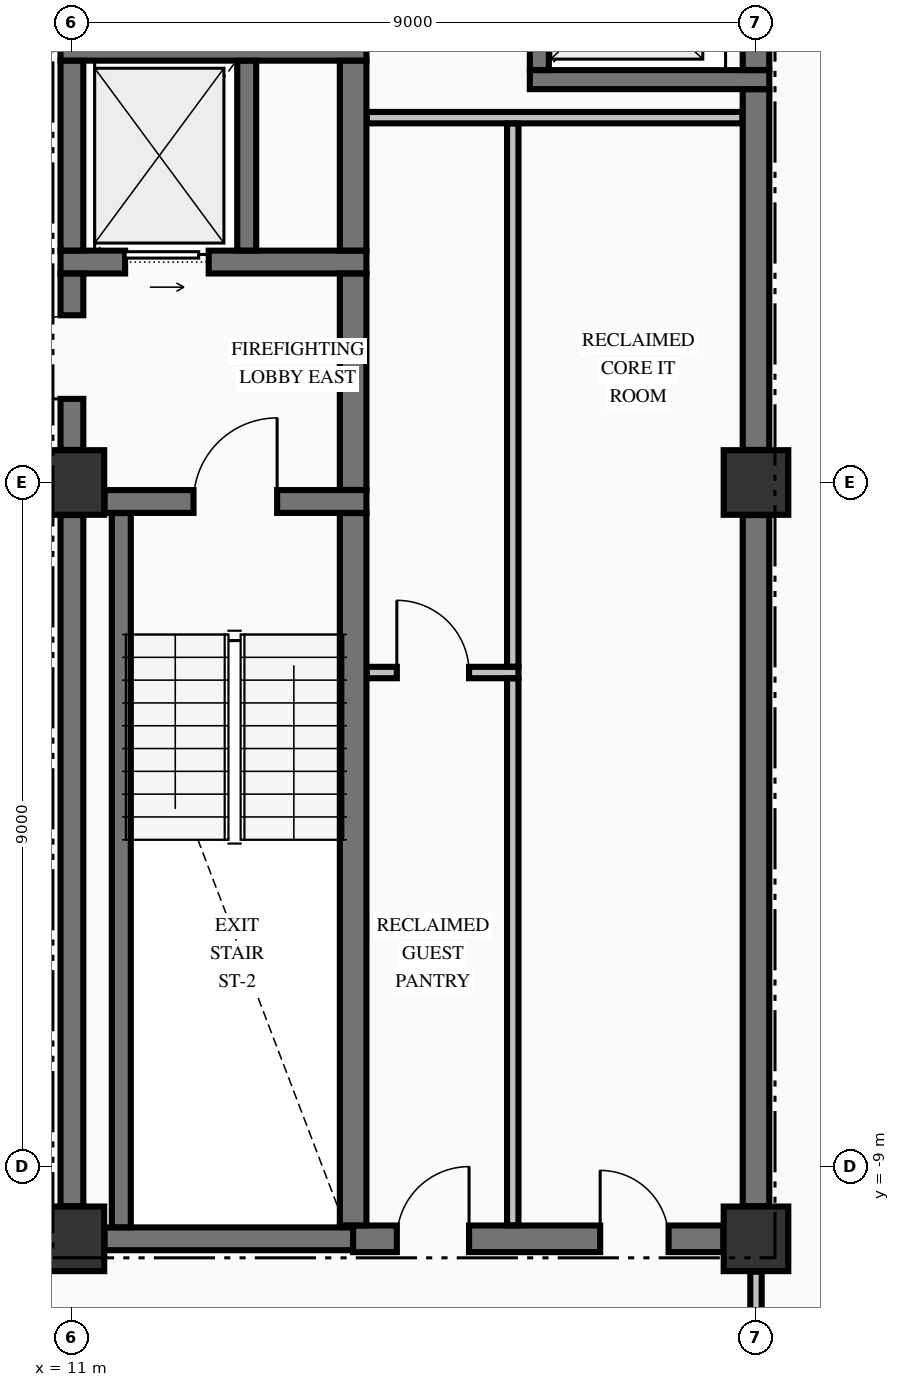
"""IFC4 building model, lengths in metres.
Left out: names, types, materials, properties, quantities, classifications, styles, units other than length and angle.
Written with IfcOpenShell. Run it as: python <this file> out.ifc"""

import sys

from ifc_helpers import new_model, si_unit, direction, frame, frame_2d, origin, origin_2d, place, context, subcontext, project, spatial, rectangle, extrude, element, fill, save


model = new_model("IFC4")
c1 = context("Model", 3, precision=1e-05, world=origin(), true_north=direction((0.0, 1.0)))
c2 = subcontext(c1, "Body", "Model", "MODEL_VIEW")
j1 = project(units=[si_unit("LENGTHUNIT", "METRE"), si_unit("PLANEANGLEUNIT", "RADIAN")], contexts=[c1])
p1 = place(None, origin())
s1 = spatial("IfcSite", under=j1, at=p1, CompositionType="ELEMENT")
p2 = place(p1, origin())
s2 = spatial("IfcBuilding", under=s1, at=p2, CompositionType="ELEMENT")
p3 = place(p2, frame((0.0, 0.0, 218.66)))
s3 = spatial("IfcBuildingStorey", under=s2, at=p3, CompositionType="ELEMENT", Elevation=218.66)
for number, where, z_axis, x_axis in (
    (1, (11.0, -9.95, -0.25), (0.0, 0.0, 1.0), (1.0, 0.0, 0.0)),
    (2, (11.0, 0.0, -0.25), (0.0, 0.0, 1.0), (1.0, 0.0, 0.0)),
    (3, (20.0, -9.95, -0.25), (0.0, 0.0, 1.0), (1.0, 0.0, 0.0)),
    (4, (20.0, 0.0, -0.25), (0.0, 0.0, 1.0), (1.0, 0.0, 0.0)),
):
    element("IfcColumn", number, at=place(p3, frame(where, z_axis=z_axis, x_axis=x_axis)), inside=s3, PredefinedType="COLUMN", context=c2, shape_type="SweptSolid", body=[
        extrude(rectangle(XDim=0.85, YDim=0.85, at=origin_2d()), origin(), (0.0, 0.0, 1.0), 3.225),
    ])
p4 = place(p3, frame((11.429, -9.95, 0.0), z_axis=(0.0, 0.0, 1.0), x_axis=(1.0, 0.0, 0.0)))
e5 = element("IfcWall", 5, at=p4, inside=s3, PredefinedType="SHEAR", context=c2, shape_type="SweptSolid", body=[
    extrude(rectangle(XDim=3.271, YDim=0.3, at=frame_2d((1.635, 0.0))), origin(), (0.0, 0.0, 1.0), 2.975),
])
p5 = place(p3, frame((14.7, -9.95, 0.0), z_axis=(0.0, 0.0, 1.0), x_axis=(1.0, 0.0, 0.0)))
e6 = element("IfcWall", 6, at=p5, inside=s3, PredefinedType="SHEAR", context=c2, shape_type="SweptSolid", body=[
    extrude(rectangle(XDim=4.871, YDim=0.35, at=frame_2d((2.436, 0.0))), origin(), (0.0, 0.0, 1.0), 2.975),
])
p6 = place(p5, frame((3.25, 0.0, 0.0)))
e7 = element("IfcOpeningElement", 7, at=p6, cuts=e6, PredefinedType="OPENING", context=c2, shape_type="SweptSolid", body=[
    extrude(rectangle(XDim=0.9, YDim=2.15, at=frame_2d((0.45, 1.075))), frame((0.0, 0.185, 0.0), z_axis=(0.0, -1.0, 0.0), x_axis=(1.0, 0.0, 0.0)), (0.0, 0.0, 1.0), 0.37),
])
p7 = place(p5, frame((0.575, 0.0, 0.0)))
e8 = element("IfcOpeningElement", 8, at=p7, cuts=e6, PredefinedType="OPENING", context=c2, shape_type="SweptSolid", body=[
    extrude(rectangle(XDim=0.95, YDim=2.15, at=frame_2d((0.475, 1.075))), frame((0.0, 0.185, 0.0), z_axis=(0.0, -1.0, 0.0), x_axis=(1.0, 0.0, 0.0)), (0.0, 0.0, 1.0), 0.37),
])
p8 = place(p3, frame((11.429, -0.25, 0.0), z_axis=(0.0, 0.0, 1.0), x_axis=(1.0, 0.0, 0.0)))
e9 = element("IfcWall", 9, at=p8, inside=s3, PredefinedType="SHEAR", context=c2, shape_type="SweptSolid", body=[
    extrude(rectangle(XDim=3.446, YDim=0.3, at=frame_2d((1.723, 0.0))), origin(), (0.0, 0.0, 1.0), 2.975),
])
p9 = place(p8, frame((1.171, 0.0, 0.0)))
e10 = element("IfcOpeningElement", 10, at=p9, cuts=e9, PredefinedType="OPENING", context=c2, shape_type="SweptSolid", body=[
    extrude(rectangle(XDim=1.1, YDim=2.15, at=frame_2d((0.55, 1.075))), frame((0.0, 0.16, 0.0), z_axis=(0.0, -1.0, 0.0), x_axis=(1.0, 0.0, 0.0)), (0.0, 0.0, 1.0), 0.32),
])
p10 = place(p3, frame((10.85, 2.9, 0.0), z_axis=(0.0, 0.0, 1.0), x_axis=(1.0, 0.0, 0.0)))
e11 = element("IfcWall", 11, at=p10, inside=s3, PredefinedType="SHEAR", context=c2, shape_type="SweptSolid", body=[
    extrude(rectangle(XDim=4.025, YDim=0.3, at=frame_2d((2.012, 0.0))), origin(), (0.0, 0.0, 1.0), 2.975),
])
p11 = place(p10, frame((0.85, 0.0, 0.0)))
e12 = element("IfcOpeningElement", 12, at=p11, cuts=e11, PredefinedType="OPENING", context=c2, shape_type="SweptSolid", body=[
    extrude(rectangle(XDim=1.1, YDim=2.2, at=frame_2d((0.55, 1.1))), frame((0.0, 0.16, 0.0), z_axis=(0.0, -1.0, 0.0), x_axis=(1.0, 0.0, 0.0)), (0.0, 0.0, 1.0), 0.32),
])
p12 = place(p3, frame((17.025, 5.3, 0.0), z_axis=(0.0, 0.0, 1.0), x_axis=(1.0, 0.0, 0.0)))
e13 = element("IfcWall", 13, at=p12, inside=s3, PredefinedType="SOLIDWALL", context=c2, shape_type="SweptSolid", body=[
    extrude(rectangle(XDim=3.15, YDim=0.25, at=frame_2d((1.575, 0.0))), origin(), (0.0, 0.0, 1.0), 2.975),
])
p13 = place(p3, frame((10.85, 5.7, 0.0), z_axis=(0.0, 0.0, 1.0), x_axis=(1.0, 0.0, 0.0)))
e14 = element("IfcWall", 14, at=p13, inside=s3, PredefinedType="SHEAR", context=c2, shape_type="SweptSolid", body=[
    extrude(rectangle(XDim=4.025, YDim=0.3, at=frame_2d((2.012, 0.0))), origin(), (0.0, 0.0, 1.0), 2.975),
])
p14 = place(p3, frame((14.878, -2.5, 0.0), z_axis=(0.0, 0.0, 1.0), x_axis=(1.0, 0.0, 0.0)))
e15 = element("IfcWall", 15, at=p14, inside=s3, PredefinedType="PARTITIONING", context=c2, shape_type="SweptSolid", body=[
    extrude(rectangle(XDim=1.997, YDim=0.15, at=frame_2d((0.999, 0.0))), origin(), (0.0, 0.0, 1.0), 2.975),
])
p15 = place(p14, frame((0.397, 0.0, 0.0)))
e16 = element("IfcOpeningElement", 16, at=p15, cuts=e15, PredefinedType="OPENING", context=c2, shape_type="SweptSolid", body=[
    extrude(rectangle(XDim=0.95, YDim=2.15, at=frame_2d((0.475, 1.075))), frame((0.0, 0.085, 0.0), z_axis=(0.0, -1.0, 0.0), x_axis=(1.0, 0.0, 0.0)), (0.0, 0.0, 1.0), 0.17),
])
p16 = place(p3, frame((14.878, 4.8, 0.0), z_axis=(0.0, 0.0, 1.0), x_axis=(1.0, 0.0, 0.0)))
e17 = element("IfcWall", 17, at=p16, inside=s3, PredefinedType="PARTITIONING", context=c2, shape_type="SweptSolid", body=[
    extrude(rectangle(XDim=4.944, YDim=0.15, at=frame_2d((2.472, 0.0))), origin(), (0.0, 0.0, 1.0), 2.975),
])
p17 = place(p3, frame((11.0, -9.521, 0.0), z_axis=(0.0, 0.0, 1.0), x_axis=(0.0, 1.0, 0.0)))
e18 = element("IfcWall", 18, at=p17, inside=s3, PredefinedType="SHEAR", context=c2, shape_type="SweptSolid", body=[
    extrude(rectangle(XDim=9.092, YDim=0.3, at=frame_2d((4.546, 0.0))), origin(), (0.0, 0.0, 1.0), 2.975),
])
p18 = place(p3, frame((11.0, 0.429, 0.0), z_axis=(0.0, 0.0, 1.0), x_axis=(0.0, 1.0, 0.0)))
e19 = element("IfcWall", 19, at=p18, inside=s3, PredefinedType="SHEAR", context=c2, shape_type="SweptSolid", body=[
    extrude(rectangle(XDim=2.319, YDim=0.3, at=frame_2d((1.16, 0.0))), origin(), (0.0, 0.0, 1.0), 2.975),
])
p19 = place(p18, frame((0.671, 0.0, 0.0)))
e20 = element("IfcOpeningElement", 20, at=p19, cuts=e19, PredefinedType="OPENING", context=c2, shape_type="SweptSolid", body=[
    extrude(rectangle(XDim=1.1, YDim=2.15, at=frame_2d((0.55, 1.075))), frame((0.0, 0.16, 0.0), z_axis=(0.0, -1.0, 0.0), x_axis=(1.0, 0.0, 0.0)), (0.0, 0.0, 1.0), 0.32),
])
p20 = place(p3, frame((11.0, 3.052, 0.0), z_axis=(0.0, 0.0, 1.0), x_axis=(0.0, 1.0, 0.0)))
e21 = element("IfcWall", 21, at=p20, inside=s3, PredefinedType="SHEAR", context=c2, shape_type="SweptSolid", body=[
    extrude(rectangle(XDim=2.496, YDim=0.3, at=frame_2d((1.248, 0.0))), origin(), (0.0, 0.0, 1.0), 2.975),
])
p21 = place(p3, frame((11.65, -9.798, 0.0), z_axis=(0.0, 0.0, 1.0), x_axis=(0.0, 1.0, 0.0)))
e22 = element("IfcWall", 22, at=p21, inside=s3, PredefinedType="SOLIDWALL", context=c2, shape_type="SweptSolid", body=[
    extrude(rectangle(XDim=9.396, YDim=0.25, at=frame_2d((4.698, 0.0))), origin(), (0.0, 0.0, 1.0), 2.975),
])
p22 = place(p3, frame((13.3, 3.052, 0.0), z_axis=(0.0, 0.0, 1.0), x_axis=(0.0, 1.0, 0.0)))
e23 = element("IfcWall", 23, at=p22, inside=s3, PredefinedType="SOLIDWALL", context=c2, shape_type="SweptSolid", body=[
    extrude(rectangle(XDim=2.496, YDim=0.25, at=frame_2d((1.248, 0.0))), origin(), (0.0, 0.0, 1.0), 2.975),
])
p23 = place(p3, frame((14.7, -9.773, 0.0), z_axis=(0.0, 0.0, 1.0), x_axis=(0.0, 1.0, 0.0)))
e24 = element("IfcWall", 24, at=p23, inside=s3, PredefinedType="SHEAR", context=c2, shape_type="SweptSolid", body=[
    extrude(rectangle(XDim=9.371, YDim=0.35, at=frame_2d((4.686, 0.0))), origin(), (0.0, 0.0, 1.0), 2.975),
])
p24 = place(p3, frame((14.7, -0.098, 0.0), z_axis=(0.0, 0.0, 1.0), x_axis=(0.0, 1.0, 0.0)))
e25 = element("IfcWall", 25, at=p24, inside=s3, PredefinedType="SHEAR", context=c2, shape_type="SweptSolid", body=[
    extrude(rectangle(XDim=2.846, YDim=0.35, at=frame_2d((1.423, 0.0))), origin(), (0.0, 0.0, 1.0), 2.975),
])
p25 = place(p3, frame((14.7, 3.052, 0.0), z_axis=(0.0, 0.0, 1.0), x_axis=(0.0, 1.0, 0.0)))
e26 = element("IfcWall", 26, at=p25, inside=s3, PredefinedType="SHEAR", context=c2, shape_type="SweptSolid", body=[
    extrude(rectangle(XDim=2.496, YDim=0.35, at=frame_2d((1.248, 0.0))), origin(), (0.0, 0.0, 1.0), 2.975),
])
p26 = place(p3, frame((17.15, 5.427, 0.0), z_axis=(0.0, 0.0, 1.0), x_axis=(0.0, 1.0, 0.0)))
e27 = element("IfcWall", 27, at=p26, inside=s3, PredefinedType="SOLIDWALL", context=c2, shape_type="SweptSolid", body=[
    extrude(rectangle(XDim=2.196, YDim=0.25, at=frame_2d((1.098, 0.0))), origin(), (0.0, 0.0, 1.0), 2.975),
])
p27 = place(p26, frame((0.548, 0.0, 0.0)))
e28 = element("IfcOpeningElement", 28, at=p27, cuts=e27, PredefinedType="OPENING", context=c2, shape_type="SweptSolid", body=[
    extrude(rectangle(XDim=1.1, YDim=2.2, at=frame_2d((0.55, 1.1))), frame((0.0, 0.135, 0.0), z_axis=(0.0, -1.0, 0.0), x_axis=(1.0, 0.0, 0.0)), (0.0, 0.0, 1.0), 0.27),
])
p28 = place(p3, frame((20.0, -9.521, 0.0), z_axis=(0.0, 0.0, 1.0), x_axis=(0.0, 1.0, 0.0)))
e29 = element("IfcWall", 29, at=p28, inside=s3, PredefinedType="SHEAR", context=c2, shape_type="SweptSolid", body=[
    extrude(rectangle(XDim=9.092, YDim=0.35, at=frame_2d((4.546, 0.0))), origin(), (0.0, 0.0, 1.0), 2.975),
])
p29 = place(p3, frame((20.0, 0.429, 0.0), z_axis=(0.0, 0.0, 1.0), x_axis=(0.0, 1.0, 0.0)))
e30 = element("IfcWall", 30, at=p29, inside=s3, PredefinedType="SHEAR", context=c2, shape_type="SweptSolid", body=[
    extrude(rectangle(XDim=4.744, YDim=0.35, at=frame_2d((2.372, 0.0))), origin(), (0.0, 0.0, 1.0), 2.975),
])
p30 = place(p3, frame((20.0, 5.427, 0.0), z_axis=(0.0, 0.0, 1.0), x_axis=(0.0, 1.0, 0.0)))
e31 = element("IfcWall", 31, at=p30, inside=s3, PredefinedType="SHEAR", context=c2, shape_type="SweptSolid", body=[
    extrude(rectangle(XDim=2.196, YDim=0.35, at=frame_2d((1.098, 0.0))), origin(), (0.0, 0.0, 1.0), 2.975),
])
p31 = place(p3, frame((16.8, -9.772, 0.0), z_axis=(0.0, 0.0, 1.0), x_axis=(0.0, 1.0, 0.0)))
e32 = element("IfcWall", 32, at=p31, inside=s3, PredefinedType="PARTITIONING", context=c2, shape_type="SweptSolid", body=[
    extrude(rectangle(XDim=7.194, YDim=0.15, at=frame_2d((3.597, 0.0))), origin(), (0.0, 0.0, 1.0), 2.975),
])
p32 = place(p3, frame((16.8, -2.422, 0.0), z_axis=(0.0, 0.0, 1.0), x_axis=(0.0, 1.0, 0.0)))
e33 = element("IfcWall", 33, at=p32, inside=s3, PredefinedType="PARTITIONING", context=c2, shape_type="SweptSolid", body=[
    extrude(rectangle(XDim=7.144, YDim=0.15, at=frame_2d((3.572, 0.0))), origin(), (0.0, 0.0, 1.0), 2.975),
])
p33 = place(p3, frame((20.0, -12.222, 0.0), z_axis=(0.0, 0.0, 1.0), x_axis=(0.0, 1.0, 0.0)))
e34 = element("IfcWall", 34, at=p33, inside=s3, PredefinedType="PARTITIONING", context=c2, shape_type="SweptSolid", body=[
    extrude(rectangle(XDim=1.841, YDim=0.15, at=frame_2d((0.92, 0.0))), origin(), (0.0, 0.0, 1.0), 2.167),
])
p34 = place(p9, origin())
e35 = element("IfcDoor", 35, at=p34, inside=s3, OperationType="SINGLE_SWING_RIGHT", PredefinedType="DOOR", context=c2, shape_type="SweptSolid", body=[
    extrude(rectangle(XDim=1.1, YDim=2.15, at=frame_2d((0.55, 1.075))), frame((0.0, 0.025, 0.0), z_axis=(0.0, -1.0, 0.0), x_axis=(1.0, 0.0, 0.0)), (0.0, 0.0, 1.0), 0.05),
])
fill(e10, e35)
p35 = place(p19, origin())
e36 = element("IfcDoor", 36, at=p35, inside=s3, OperationType="SINGLE_SWING_LEFT", PredefinedType="DOOR", context=c2, shape_type="SweptSolid", body=[
    extrude(rectangle(XDim=1.1, YDim=2.15, at=frame_2d((0.55, 1.075))), frame((0.0, 0.025, 0.0), z_axis=(0.0, -1.0, 0.0), x_axis=(1.0, 0.0, 0.0)), (0.0, 0.0, 1.0), 0.05),
])
fill(e20, e36)
p36 = place(p11, origin())
e37 = element("IfcDoor", 37, at=p36, inside=s3, OperationType="SLIDING_TO_RIGHT", PredefinedType="DOOR", context=c2, shape_type="SweptSolid", body=[
    extrude(rectangle(XDim=1.1, YDim=2.2, at=frame_2d((0.55, 1.1))), frame((0.0, 0.025, 0.0), z_axis=(0.0, -1.0, 0.0), x_axis=(1.0, 0.0, 0.0)), (0.0, 0.0, 1.0), 0.05),
])
fill(e12, e37)
p37 = place(p6, origin())
e38 = element("IfcDoor", 38, at=p37, inside=s3, OperationType="SINGLE_SWING_LEFT", PredefinedType="DOOR", context=c2, shape_type="SweptSolid", body=[
    extrude(rectangle(XDim=0.9, YDim=2.15, at=frame_2d((0.45, 1.075))), frame((0.0, 0.025, 0.0), z_axis=(0.0, -1.0, 0.0), x_axis=(1.0, 0.0, 0.0)), (0.0, 0.0, 1.0), 0.05),
])
fill(e7, e38)
p38 = place(p7, origin())
e39 = element("IfcDoor", 39, at=p38, inside=s3, OperationType="SINGLE_SWING_RIGHT", PredefinedType="DOOR", context=c2, shape_type="SweptSolid", body=[
    extrude(rectangle(XDim=0.95, YDim=2.15, at=frame_2d((0.475, 1.075))), frame((0.0, 0.025, 0.0), z_axis=(0.0, -1.0, 0.0), x_axis=(1.0, 0.0, 0.0)), (0.0, 0.0, 1.0), 0.05),
])
fill(e8, e39)
p39 = place(p15, origin())
e40 = element("IfcDoor", 40, at=p39, inside=s3, OperationType="SINGLE_SWING_LEFT", PredefinedType="DOOR", context=c2, shape_type="SweptSolid", body=[
    extrude(rectangle(XDim=0.95, YDim=2.15, at=frame_2d((0.475, 1.075))), frame((0.0, 0.025, 0.0), z_axis=(0.0, -1.0, 0.0), x_axis=(1.0, 0.0, 0.0)), (0.0, 0.0, 1.0), 0.05),
])
fill(e16, e40)
save(model, sys.argv[1])
